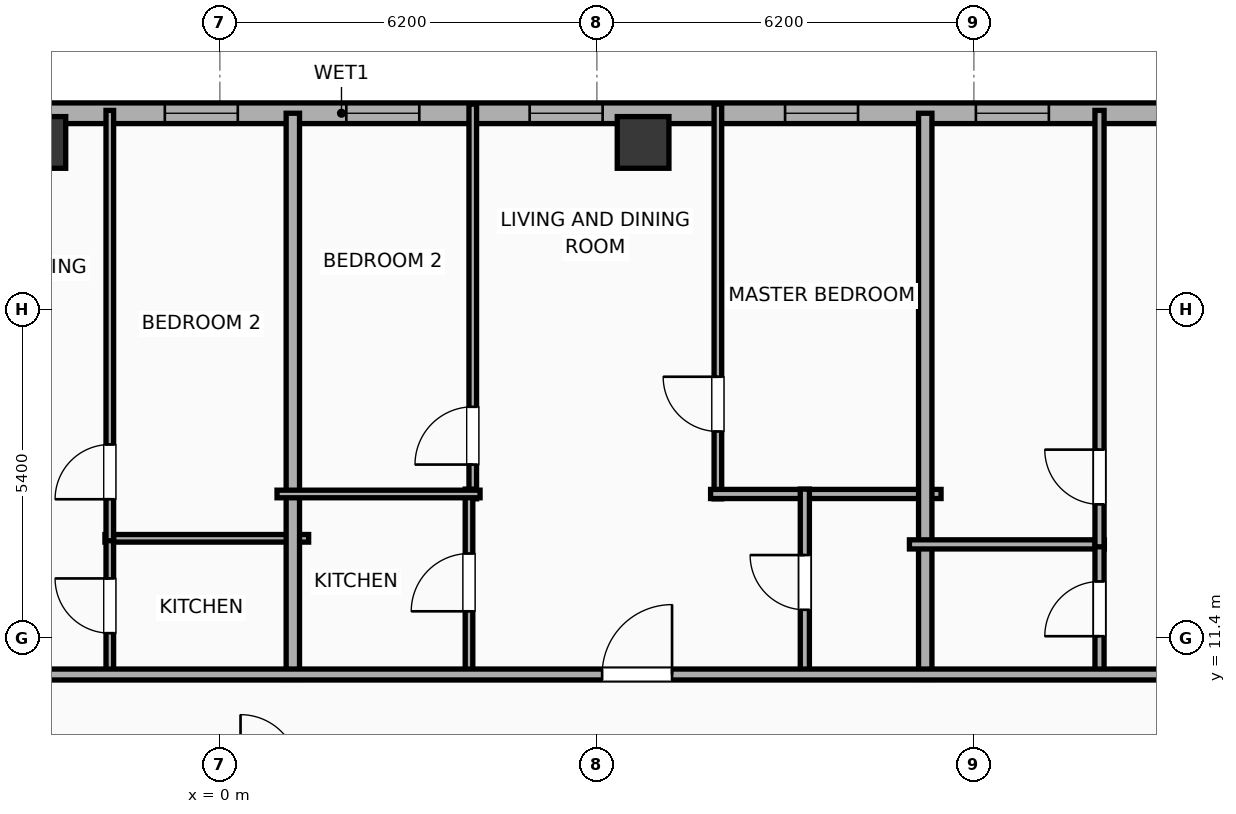
"""IFC4 building model, lengths in metres.
Left out: names, types, materials, properties, quantities, classifications, styles, units other than length and angle.
Written with IfcOpenShell. Run it as: python <this file> out.ifc"""

import sys

from ifc_helpers import new_model, si_unit, direction, frame, frame_2d, origin, origin_2d, place, context, subcontext, project, spatial, rectangle, hollow_rectangle, extrude, element, fill, save


model = new_model("IFC4")
c1 = context("Model", 3, precision=1e-05, world=origin(), true_north=direction((0.0, 1.0)))
c2 = subcontext(c1, "Body", "Model", "MODEL_VIEW")
j1 = project(units=[si_unit("LENGTHUNIT", "METRE"), si_unit("PLANEANGLEUNIT", "RADIAN")], contexts=[c1])
p1 = place(None, origin())
s1 = spatial("IfcSite", under=j1, at=p1, CompositionType="ELEMENT")
p2 = place(p1, origin())
s2 = spatial("IfcBuilding", under=s1, at=p2, CompositionType="ELEMENT")
p3 = place(p2, frame((0.0, 0.0, 215.8)))
s3 = spatial("IfcBuildingStorey", under=s2, at=p3, CompositionType="ELEMENT", Elevation=215.8)
for number, where, z_axis, x_axis in (
    (1, (6.96, 19.55, 0.0), (0.0, 0.0, 1.0), (1.0, 0.0, 0.0)),
    (2, (-2.96, 19.55, 0.0), (0.0, 0.0, 1.0), (1.0, 0.0, 0.0)),
):
    element("IfcColumn", number, at=place(p3, frame(where, z_axis=z_axis, x_axis=x_axis)), inside=s3, PredefinedType="COLUMN", context=c2, shape_type="SweptSolid", body=[
        extrude(hollow_rectangle(XDim=0.85, YDim=0.85, WallThickness=0.028, at=origin_2d()), origin(), (0.0, 0.0, 1.0), 3.9),
    ])
p4 = place(p3, frame((-22.783, 20.03, 0.0), z_axis=(0.0, 0.0, 1.0), x_axis=(1.0, 0.0, 0.0)))
e3 = element("IfcWall", 3, at=p4, inside=s3, PredefinedType="ELEMENTEDWALL", context=c2, shape_type="SweptSolid", body=[
    extrude(rectangle(XDim=49.566, YDim=0.34, at=frame_2d((24.783, 0.0))), origin(), (0.0, 0.0, 1.0), 3.65),
])
p5 = place(p4, frame((40.956, 0.0, 0.75)))
e4 = element("IfcOpeningElement", 4, at=p5, cuts=e3, PredefinedType="OPENING", context=c2, shape_type="SweptSolid", body=[
    extrude(rectangle(XDim=2.4, YDim=2.1, at=frame_2d((1.2, 1.05))), frame((0.0, 0.18, 0.0), z_axis=(0.0, -1.0, 0.0), x_axis=(1.0, 0.0, 0.0)), (0.0, 0.0, 1.0), 0.36),
])
p6 = place(p4, frame((1.437, 0.0, 0.75)))
e5 = element("IfcOpeningElement", 5, at=p6, cuts=e3, PredefinedType="OPENING", context=c2, shape_type="SweptSolid", body=[
    extrude(rectangle(XDim=1.2, YDim=2.05, at=frame_2d((0.6, 1.025))), frame((0.0, 0.18, 0.0), z_axis=(0.0, -1.0, 0.0), x_axis=(1.0, 0.0, 0.0)), (0.0, 0.0, 1.0), 0.36),
])
p7 = place(p4, frame((7.619, 0.0, 0.75)))
e6 = element("IfcOpeningElement", 6, at=p7, cuts=e3, PredefinedType="OPENING", context=c2, shape_type="SweptSolid", body=[
    extrude(rectangle(XDim=1.2, YDim=2.05, at=frame_2d((0.6, 1.025))), frame((0.0, 0.18, 0.0), z_axis=(0.0, -1.0, 0.0), x_axis=(1.0, 0.0, 0.0)), (0.0, 0.0, 1.0), 0.36),
])
p8 = place(p4, frame((4.124, 0.0, 0.75)))
e7 = element("IfcOpeningElement", 7, at=p8, cuts=e3, PredefinedType="OPENING", context=c2, shape_type="SweptSolid", body=[
    extrude(rectangle(XDim=1.2, YDim=2.05, at=frame_2d((0.6, 1.025))), frame((0.0, 0.18, 0.0), z_axis=(0.0, -1.0, 0.0), x_axis=(1.0, 0.0, 0.0)), (0.0, 0.0, 1.0), 0.36),
])
p9 = place(p4, frame((11.278, 0.0, 0.75)))
e8 = element("IfcOpeningElement", 8, at=p9, cuts=e3, PredefinedType="OPENING", context=c2, shape_type="SweptSolid", body=[
    extrude(rectangle(XDim=1.2, YDim=2.05, at=frame_2d((0.6, 1.025))), frame((0.0, 0.18, 0.0), z_axis=(0.0, -1.0, 0.0), x_axis=(1.0, 0.0, 0.0)), (0.0, 0.0, 1.0), 0.36),
])
p10 = place(p4, frame((17.953, 0.0, 0.75)))
e9 = element("IfcOpeningElement", 9, at=p10, cuts=e3, PredefinedType="OPENING", context=c2, shape_type="SweptSolid", body=[
    extrude(rectangle(XDim=1.2, YDim=2.05, at=frame_2d((0.6, 1.025))), frame((0.0, 0.18, 0.0), z_axis=(0.0, -1.0, 0.0), x_axis=(1.0, 0.0, 0.0)), (0.0, 0.0, 1.0), 0.36),
])
p11 = place(p4, frame((14.738, 0.0, 0.75)))
e10 = element("IfcOpeningElement", 10, at=p11, cuts=e3, PredefinedType="OPENING", context=c2, shape_type="SweptSolid", body=[
    extrude(rectangle(XDim=1.2, YDim=2.05, at=frame_2d((0.6, 1.025))), frame((0.0, 0.18, 0.0), z_axis=(0.0, -1.0, 0.0), x_axis=(1.0, 0.0, 0.0)), (0.0, 0.0, 1.0), 0.36),
])
p12 = place(p4, frame((21.878, 0.0, 0.75)))
e11 = element("IfcOpeningElement", 11, at=p12, cuts=e3, PredefinedType="OPENING", context=c2, shape_type="SweptSolid", body=[
    extrude(rectangle(XDim=1.2, YDim=2.05, at=frame_2d((0.6, 1.025))), frame((0.0, 0.18, 0.0), z_axis=(0.0, -1.0, 0.0), x_axis=(1.0, 0.0, 0.0)), (0.0, 0.0, 1.0), 0.36),
])
p13 = place(p4, frame((27.878, 0.0, 0.75)))
e12 = element("IfcOpeningElement", 12, at=p13, cuts=e3, PredefinedType="OPENING", context=c2, shape_type="SweptSolid", body=[
    extrude(rectangle(XDim=1.2, YDim=2.05, at=frame_2d((0.6, 1.025))), frame((0.0, 0.18, 0.0), z_axis=(0.0, -1.0, 0.0), x_axis=(1.0, 0.0, 0.0)), (0.0, 0.0, 1.0), 0.36),
])
p14 = place(p4, frame((24.863, 0.0, 0.75)))
e13 = element("IfcOpeningElement", 13, at=p14, cuts=e3, PredefinedType="OPENING", context=c2, shape_type="SweptSolid", body=[
    extrude(rectangle(XDim=1.2, YDim=2.05, at=frame_2d((0.6, 1.025))), frame((0.0, 0.18, 0.0), z_axis=(0.0, -1.0, 0.0), x_axis=(1.0, 0.0, 0.0)), (0.0, 0.0, 1.0), 0.36),
])
p15 = place(p4, frame((32.078, 0.0, 0.75)))
e14 = element("IfcOpeningElement", 14, at=p15, cuts=e3, PredefinedType="OPENING", context=c2, shape_type="SweptSolid", body=[
    extrude(rectangle(XDim=1.2, YDim=2.05, at=frame_2d((0.6, 1.025))), frame((0.0, 0.18, 0.0), z_axis=(0.0, -1.0, 0.0), x_axis=(1.0, 0.0, 0.0)), (0.0, 0.0, 1.0), 0.36),
])
p16 = place(p4, frame((35.216, 0.0, 0.75)))
e15 = element("IfcOpeningElement", 15, at=p16, cuts=e3, PredefinedType="OPENING", context=c2, shape_type="SweptSolid", body=[
    extrude(rectangle(XDim=1.2, YDim=2.05, at=frame_2d((0.6, 1.025))), frame((0.0, 0.18, 0.0), z_axis=(0.0, -1.0, 0.0), x_axis=(1.0, 0.0, 0.0)), (0.0, 0.0, 1.0), 0.36),
])
p17 = place(p4, frame((45.73, 0.0, 0.75)))
e16 = element("IfcOpeningElement", 16, at=p17, cuts=e3, PredefinedType="OPENING", context=c2, shape_type="SweptSolid", body=[
    extrude(rectangle(XDim=1.2, YDim=2.05, at=frame_2d((0.6, 1.025))), frame((0.0, 0.18, 0.0), z_axis=(0.0, -1.0, 0.0), x_axis=(1.0, 0.0, 0.0)), (0.0, 0.0, 1.0), 0.36),
])
p18 = place(p3, frame((-1.89, 13.04, 0.0), z_axis=(0.0, 0.0, 1.0), x_axis=(1.0, 0.0, 0.0)))
e17 = element("IfcWall", 17, at=p18, inside=s3, PredefinedType="PARTITIONING", context=c2, shape_type="SweptSolid", body=[
    extrude(rectangle(XDim=3.35, YDim=0.125, at=frame_2d((1.675, 0.0))), origin(), (0.0, 0.0, 1.0), 3.65),
])
p19 = place(p3, frame((-1.81, 10.78, 0.0), z_axis=(0.0, 0.0, 1.0), x_axis=(0.0, 1.0, 0.0)))
e18 = element("IfcWall", 18, at=p19, inside=s3, PredefinedType="PARTITIONING", context=c2, shape_type="SweptSolid", body=[
    extrude(rectangle(XDim=2.3, YDim=0.125, at=frame_2d((1.15, 0.0))), origin(), (0.0, 0.0, 1.0), 3.65),
])
p20 = place(p19, frame((0.7, 0.0, 0.0)))
e19 = element("IfcOpeningElement", 19, at=p20, cuts=e18, PredefinedType="OPENING", context=c2, shape_type="SweptSolid", body=[
    extrude(rectangle(XDim=0.9, YDim=2.05, at=frame_2d((0.45, 1.025))), frame((0.0, 0.073, 0.0), z_axis=(0.0, -1.0, 0.0), x_axis=(1.0, 0.0, 0.0)), (0.0, 0.0, 1.0), 0.145),
])
p21 = place(p3, frame((-1.81, 13.0, 0.0), z_axis=(0.0, 0.0, 1.0), x_axis=(0.0, 1.0, 0.0)))
e20 = element("IfcWall", 20, at=p21, inside=s3, PredefinedType="PARTITIONING", context=c2, shape_type="SweptSolid", body=[
    extrude(rectangle(XDim=7.077, YDim=0.125, at=frame_2d((3.539, 0.0))), origin(), (0.0, 0.0, 1.0), 3.65),
])
p22 = place(p21, frame((0.682, 0.0, 0.0)))
e21 = element("IfcOpeningElement", 21, at=p22, cuts=e20, PredefinedType="OPENING", context=c2, shape_type="SweptSolid", body=[
    extrude(rectangle(XDim=0.9, YDim=2.05, at=frame_2d((0.45, 1.025))), frame((0.0, 0.073, 0.0), z_axis=(0.0, -1.0, 0.0), x_axis=(1.0, 0.0, 0.0)), (0.0, 0.0, 1.0), 0.145),
])
p23 = place(p3, frame((1.2, 10.72, 0.0), z_axis=(0.0, 0.0, 1.0), x_axis=(0.0, 1.0, 0.0)))
e22 = element("IfcWall", 22, at=p23, inside=s3, PredefinedType="PARTITIONING", context=c2, shape_type="SweptSolid", body=[
    extrude(rectangle(XDim=9.31, YDim=0.22, at=frame_2d((4.655, 0.0))), origin(), (0.0, 0.0, 1.0), 3.65),
])
p24 = place(p3, frame((4.159, 13.689, 0.0), z_axis=(0.0, 0.0, 1.0), x_axis=(0.0, 1.0, 0.0)))
e23 = element("IfcWall", 23, at=p24, inside=s3, PredefinedType="PARTITIONING", context=c2, shape_type="SweptSolid", body=[
    extrude(rectangle(XDim=6.491, YDim=0.125, at=frame_2d((3.246, 0.0))), origin(), (0.0, 0.0, 1.0), 3.65),
])
p25 = place(p24, frame((0.564, 0.0, 0.0)))
e24 = element("IfcOpeningElement", 24, at=p25, cuts=e23, PredefinedType="OPENING", context=c2, shape_type="SweptSolid", body=[
    extrude(rectangle(XDim=0.95, YDim=2.05, at=frame_2d((0.475, 1.025))), frame((0.0, 0.073, 0.0), z_axis=(0.0, -1.0, 0.0), x_axis=(1.0, 0.0, 0.0)), (0.0, 0.0, 1.0), 0.145),
])
p26 = place(p3, frame((8.19, 13.689, 0.0), z_axis=(0.0, 0.0, 1.0), x_axis=(0.0, 1.0, 0.0)))
e25 = element("IfcWall", 25, at=p26, inside=s3, PredefinedType="PARTITIONING", context=c2, shape_type="SweptSolid", body=[
    extrude(rectangle(XDim=6.491, YDim=0.125, at=frame_2d((3.246, 0.0))), origin(), (0.0, 0.0, 1.0), 3.65),
])
p27 = place(p26, frame((1.108, 0.0, 0.0)))
e26 = element("IfcOpeningElement", 26, at=p27, cuts=e25, PredefinedType="OPENING", context=c2, shape_type="SweptSolid", body=[
    extrude(rectangle(XDim=0.9, YDim=2.05, at=frame_2d((0.45, 1.025))), frame((0.0, 0.073, 0.0), z_axis=(0.0, -1.0, 0.0), x_axis=(1.0, 0.0, 0.0)), (0.0, 0.0, 1.0), 0.145),
])
p28 = place(p3, frame((8.07, 13.769, 0.0), z_axis=(0.0, 0.0, 1.0), x_axis=(1.0, 0.0, 0.0)))
e27 = element("IfcWall", 27, at=p28, inside=s3, PredefinedType="PLUMBINGWALL", context=c2, shape_type="SweptSolid", body=[
    extrude(rectangle(XDim=3.79, YDim=0.15, at=frame_2d((1.895, 0.0))), origin(), (0.0, 0.0, 1.0), 3.65),
])
p29 = place(p3, frame((4.097, 10.78, 0.0), z_axis=(0.0, 0.0, 1.0), x_axis=(0.0, 1.0, 0.0)))
e28 = element("IfcWall", 28, at=p29, inside=s3, PredefinedType="PARTITIONING", context=c2, shape_type="SweptSolid", body=[
    extrude(rectangle(XDim=3.069, YDim=0.125, at=frame_2d((1.535, 0.0))), origin(), (0.0, 0.0, 1.0), 3.65),
])
p30 = place(p29, frame((1.06, 0.0, 0.0)))
e29 = element("IfcOpeningElement", 29, at=p30, cuts=e28, PredefinedType="OPENING", context=c2, shape_type="SweptSolid", body=[
    extrude(rectangle(XDim=0.95, YDim=2.05, at=frame_2d((0.475, 1.025))), frame((0.0, 0.073, 0.0), z_axis=(0.0, -1.0, 0.0), x_axis=(1.0, 0.0, 0.0)), (0.0, 0.0, 1.0), 0.145),
])
p31 = place(p3, frame((0.94, 13.769, 0.0), z_axis=(0.0, 0.0, 1.0), x_axis=(1.0, 0.0, 0.0)))
e30 = element("IfcWall", 30, at=p31, inside=s3, PredefinedType="PARTITIONING", context=c2, shape_type="SweptSolid", body=[
    extrude(rectangle(XDim=3.339, YDim=0.125, at=frame_2d((1.669, 0.0))), origin(), (0.0, 0.0, 1.0), 3.65),
])
p32 = place(p3, frame((9.62, 10.78, 0.0), z_axis=(0.0, 0.0, 1.0), x_axis=(0.0, 1.0, 0.0)))
e31 = element("IfcWall", 31, at=p32, inside=s3, PredefinedType="PLUMBINGWALL", context=c2, shape_type="SweptSolid", body=[
    extrude(rectangle(XDim=3.069, YDim=0.15, at=frame_2d((1.535, 0.0))), origin(), (0.0, 0.0, 1.0), 3.65),
])
p33 = place(p32, frame((1.084, 0.0, 0.0)))
e32 = element("IfcOpeningElement", 32, at=p33, cuts=e31, PredefinedType="OPENING", context=c2, shape_type="SweptSolid", body=[
    extrude(rectangle(XDim=0.9, YDim=2.05, at=frame_2d((0.45, 1.025))), frame((0.0, 0.085, 0.0), z_axis=(0.0, -1.0, 0.0), x_axis=(1.0, 0.0, 0.0)), (0.0, 0.0, 1.0), 0.17),
])
p34 = place(p3, frame((11.6, 10.72, 0.0), z_axis=(0.0, 0.0, 1.0), x_axis=(0.0, 1.0, 0.0)))
e33 = element("IfcWall", 33, at=p34, inside=s3, PredefinedType="PARTITIONING", context=c2, shape_type="SweptSolid", body=[
    extrude(rectangle(XDim=9.31, YDim=0.22, at=frame_2d((4.655, 0.0))), origin(), (0.0, 0.0, 1.0), 3.65),
])
p35 = place(p3, frame((11.34, 12.94, 0.0), z_axis=(0.0, 0.0, 1.0), x_axis=(1.0, 0.0, 0.0)))
e34 = element("IfcWall", 34, at=p35, inside=s3, PredefinedType="PLUMBINGWALL", context=c2, shape_type="SweptSolid", body=[
    extrude(rectangle(XDim=3.206, YDim=0.15, at=frame_2d((1.603, 0.0))), origin(), (0.0, 0.0, 1.0), 3.65),
])
p36 = place(p3, frame((14.466, 10.78, 0.0), z_axis=(0.0, 0.0, 1.0), x_axis=(0.0, 1.0, 0.0)))
e35 = element("IfcWall", 35, at=p36, inside=s3, PredefinedType="PLUMBINGWALL", context=c2, shape_type="SweptSolid", body=[
    extrude(rectangle(XDim=2.2, YDim=0.15, at=frame_2d((1.1, 0.0))), origin(), (0.0, 0.0, 1.0), 3.65),
])
p37 = place(p36, frame((0.65, 0.0, 0.0)))
e36 = element("IfcOpeningElement", 36, at=p37, cuts=e35, PredefinedType="OPENING", context=c2, shape_type="SweptSolid", body=[
    extrude(rectangle(XDim=0.9, YDim=2.05, at=frame_2d((0.45, 1.025))), frame((0.0, 0.085, 0.0), z_axis=(0.0, -1.0, 0.0), x_axis=(1.0, 0.0, 0.0)), (0.0, 0.0, 1.0), 0.17),
])
p38 = place(p3, frame((14.466, 12.9, 0.0), z_axis=(0.0, 0.0, 1.0), x_axis=(0.0, 1.0, 0.0)))
e37 = element("IfcWall", 37, at=p38, inside=s3, PredefinedType="PLUMBINGWALL", context=c2, shape_type="SweptSolid", body=[
    extrude(rectangle(XDim=7.177, YDim=0.15, at=frame_2d((3.588, 0.0))), origin(), (0.0, 0.0, 1.0), 3.65),
])
p39 = place(p38, frame((0.698, 0.0, 0.0)))
e38 = element("IfcOpeningElement", 38, at=p39, cuts=e37, PredefinedType="OPENING", context=c2, shape_type="SweptSolid", body=[
    extrude(rectangle(XDim=0.9, YDim=2.05, at=frame_2d((0.45, 1.025))), frame((0.0, 0.085, 0.0), z_axis=(0.0, -1.0, 0.0), x_axis=(1.0, 0.0, 0.0)), (0.0, 0.0, 1.0), 0.17),
])
p40 = place(p3, frame((-26.23, 10.8, 0.0), z_axis=(0.0, 0.0, 1.0), x_axis=(1.0, 0.0, 0.0)))
e39 = element("IfcWall", 39, at=p40, inside=s3, PredefinedType="PARTITIONING", context=c2, shape_type="SweptSolid", body=[
    extrude(rectangle(XDim=56.46, YDim=0.18, at=frame_2d((28.23, 0.0))), origin(), (0.0, 0.0, 1.0), 3.65),
])
p41 = place(p40, frame((2.994, 0.0, 0.0)))
e40 = element("IfcOpeningElement", 40, at=p41, cuts=e39, PredefinedType="OPENING", context=c2, shape_type="SweptSolid", body=[
    extrude(rectangle(XDim=0.9, YDim=2.05, at=frame_2d((0.45, 1.025))), frame((0.0, 0.1, 0.0), z_axis=(0.0, -1.0, 0.0), x_axis=(1.0, 0.0, 0.0)), (0.0, 0.0, 1.0), 0.2),
])
p42 = place(p40, frame((11.745, 0.0, 0.0)))
e41 = element("IfcOpeningElement", 41, at=p42, cuts=e39, PredefinedType="OPENING", context=c2, shape_type="SweptSolid", body=[
    extrude(rectangle(XDim=1.15, YDim=2.05, at=frame_2d((0.575, 1.025))), frame((0.0, 0.1, 0.0), z_axis=(0.0, -1.0, 0.0), x_axis=(1.0, 0.0, 0.0)), (0.0, 0.0, 1.0), 0.2),
])
p43 = place(p40, frame((21.907, 0.0, 0.0)))
e42 = element("IfcOpeningElement", 42, at=p43, cuts=e39, PredefinedType="OPENING", context=c2, shape_type="SweptSolid", body=[
    extrude(rectangle(XDim=1.15, YDim=2.05, at=frame_2d((0.575, 1.025))), frame((0.0, 0.1, 0.0), z_axis=(0.0, -1.0, 0.0), x_axis=(1.0, 0.0, 0.0)), (0.0, 0.0, 1.0), 0.2),
])
p44 = place(p40, frame((32.516, 0.0, 0.0)))
e43 = element("IfcOpeningElement", 43, at=p44, cuts=e39, PredefinedType="OPENING", context=c2, shape_type="SweptSolid", body=[
    extrude(rectangle(XDim=1.15, YDim=2.05, at=frame_2d((0.575, 1.025))), frame((0.0, 0.1, 0.0), z_axis=(0.0, -1.0, 0.0), x_axis=(1.0, 0.0, 0.0)), (0.0, 0.0, 1.0), 0.2),
])
p45 = place(p40, frame((41.956, 0.0, 0.0)))
e44 = element("IfcOpeningElement", 44, at=p45, cuts=e39, PredefinedType="OPENING", context=c2, shape_type="SweptSolid", body=[
    extrude(rectangle(XDim=1.15, YDim=2.05, at=frame_2d((0.575, 1.025))), frame((0.0, 0.1, 0.0), z_axis=(0.0, -1.0, 0.0), x_axis=(1.0, 0.0, 0.0)), (0.0, 0.0, 1.0), 0.2),
])
p46 = place(p40, frame((51.656, 0.0, 0.0)))
e45 = element("IfcOpeningElement", 45, at=p46, cuts=e39, PredefinedType="OPENING", context=c2, shape_type="SweptSolid", body=[
    extrude(rectangle(XDim=1.15, YDim=2.05, at=frame_2d((0.575, 1.025))), frame((0.0, 0.1, 0.0), z_axis=(0.0, -1.0, 0.0), x_axis=(1.0, 0.0, 0.0)), (0.0, 0.0, 1.0), 0.2),
])
p47 = place(p12, origin())
e46 = element("IfcWindow", 46, at=p47, inside=s3, PartitioningType="SINGLE_PANEL", PredefinedType="WINDOW", context=c2, shape_type="SweptSolid", body=[
    extrude(rectangle(XDim=1.2, YDim=2.05, at=frame_2d((0.6, 1.025))), frame((0.0, 0.03, 0.0), z_axis=(0.0, -1.0, 0.0), x_axis=(1.0, 0.0, 0.0)), (0.0, 0.0, 1.0), 0.06),
])
fill(e11, e46)
p48 = place(p13, origin())
e47 = element("IfcWindow", 47, at=p48, inside=s3, PartitioningType="SINGLE_PANEL", PredefinedType="WINDOW", context=c2, shape_type="SweptSolid", body=[
    extrude(rectangle(XDim=1.2, YDim=2.05, at=frame_2d((0.6, 1.025))), frame((0.0, 0.03, 0.0), z_axis=(0.0, -1.0, 0.0), x_axis=(1.0, 0.0, 0.0)), (0.0, 0.0, 1.0), 0.06),
])
fill(e12, e47)
p49 = place(p14, origin())
e48 = element("IfcWindow", 48, at=p49, inside=s3, PartitioningType="SINGLE_PANEL", PredefinedType="WINDOW", context=c2, shape_type="SweptSolid", body=[
    extrude(rectangle(XDim=1.2, YDim=2.05, at=frame_2d((0.6, 1.025))), frame((0.0, 0.03, 0.0), z_axis=(0.0, -1.0, 0.0), x_axis=(1.0, 0.0, 0.0)), (0.0, 0.0, 1.0), 0.06),
])
fill(e13, e48)
p50 = place(p15, origin())
e49 = element("IfcWindow", 49, at=p50, inside=s3, PartitioningType="SINGLE_PANEL", PredefinedType="WINDOW", context=c2, shape_type="SweptSolid", body=[
    extrude(rectangle(XDim=1.2, YDim=2.05, at=frame_2d((0.6, 1.025))), frame((0.0, 0.03, 0.0), z_axis=(0.0, -1.0, 0.0), x_axis=(1.0, 0.0, 0.0)), (0.0, 0.0, 1.0), 0.06),
])
fill(e14, e49)
p51 = place(p16, origin())
e50 = element("IfcWindow", 50, at=p51, inside=s3, PartitioningType="SINGLE_PANEL", PredefinedType="WINDOW", context=c2, shape_type="SweptSolid", body=[
    extrude(rectangle(XDim=1.2, YDim=2.05, at=frame_2d((0.6, 1.025))), frame((0.0, 0.03, 0.0), z_axis=(0.0, -1.0, 0.0), x_axis=(1.0, 0.0, 0.0)), (0.0, 0.0, 1.0), 0.06),
])
fill(e15, e50)
p52 = place(p20, origin())
e51 = element("IfcDoor", 51, at=p52, inside=s3, OperationType="SINGLE_SWING_RIGHT", PredefinedType="DOOR", context=c2, shape_type="SweptSolid", body=[
    extrude(rectangle(XDim=0.9, YDim=2.05, at=frame_2d((0.45, 1.025))), frame((0.0, 0.025, 0.0), z_axis=(0.0, -1.0, 0.0), x_axis=(1.0, 0.0, 0.0)), (0.0, 0.0, 1.0), 0.05),
])
fill(e19, e51)
p53 = place(p22, origin())
e52 = element("IfcDoor", 52, at=p53, inside=s3, OperationType="SINGLE_SWING_LEFT", PredefinedType="DOOR", context=c2, shape_type="SweptSolid", body=[
    extrude(rectangle(XDim=0.9, YDim=2.05, at=frame_2d((0.45, 1.025))), frame((0.0, 0.025, 0.0), z_axis=(0.0, -1.0, 0.0), x_axis=(1.0, 0.0, 0.0)), (0.0, 0.0, 1.0), 0.05),
])
fill(e21, e52)
p54 = place(p25, origin())
e53 = element("IfcDoor", 53, at=p54, inside=s3, OperationType="SINGLE_SWING_LEFT", PredefinedType="DOOR", context=c2, shape_type="SweptSolid", body=[
    extrude(rectangle(XDim=0.95, YDim=2.05, at=frame_2d((0.475, 1.025))), frame((0.0, 0.025, 0.0), z_axis=(0.0, -1.0, 0.0), x_axis=(1.0, 0.0, 0.0)), (0.0, 0.0, 1.0), 0.05),
])
fill(e24, e53)
p55 = place(p27, origin())
e54 = element("IfcDoor", 54, at=p55, inside=s3, OperationType="SINGLE_SWING_RIGHT", PredefinedType="DOOR", context=c2, shape_type="SweptSolid", body=[
    extrude(rectangle(XDim=0.9, YDim=2.05, at=frame_2d((0.45, 1.025))), frame((0.0, 0.025, 0.0), z_axis=(0.0, -1.0, 0.0), x_axis=(1.0, 0.0, 0.0)), (0.0, 0.0, 1.0), 0.05),
])
fill(e26, e54)
p56 = place(p30, origin())
e55 = element("IfcDoor", 55, at=p56, inside=s3, OperationType="SINGLE_SWING_LEFT", PredefinedType="DOOR", context=c2, shape_type="SweptSolid", body=[
    extrude(rectangle(XDim=0.95, YDim=2.05, at=frame_2d((0.475, 1.025))), frame((0.0, 0.025, 0.0), z_axis=(0.0, -1.0, 0.0), x_axis=(1.0, 0.0, 0.0)), (0.0, 0.0, 1.0), 0.05),
])
fill(e29, e55)
p57 = place(p33, origin())
e56 = element("IfcDoor", 56, at=p57, inside=s3, OperationType="SINGLE_SWING_RIGHT", PredefinedType="DOOR", context=c2, shape_type="SweptSolid", body=[
    extrude(rectangle(XDim=0.9, YDim=2.05, at=frame_2d((0.45, 1.025))), frame((0.0, 0.025, 0.0), z_axis=(0.0, -1.0, 0.0), x_axis=(1.0, 0.0, 0.0)), (0.0, 0.0, 1.0), 0.05),
])
fill(e32, e56)
p58 = place(p37, origin())
e57 = element("IfcDoor", 57, at=p58, inside=s3, OperationType="SINGLE_SWING_LEFT", PredefinedType="DOOR", context=c2, shape_type="SweptSolid", body=[
    extrude(rectangle(XDim=0.9, YDim=2.05, at=frame_2d((0.45, 1.025))), frame((0.0, 0.025, 0.0), z_axis=(0.0, -1.0, 0.0), x_axis=(1.0, 0.0, 0.0)), (0.0, 0.0, 1.0), 0.05),
])
fill(e36, e57)
p59 = place(p39, origin())
e58 = element("IfcDoor", 58, at=p59, inside=s3, OperationType="SINGLE_SWING_RIGHT", PredefinedType="DOOR", context=c2, shape_type="SweptSolid", body=[
    extrude(rectangle(XDim=0.9, YDim=2.05, at=frame_2d((0.45, 1.025))), frame((0.0, 0.025, 0.0), z_axis=(0.0, -1.0, 0.0), x_axis=(1.0, 0.0, 0.0)), (0.0, 0.0, 1.0), 0.05),
])
fill(e38, e58)
p60 = place(p44, origin())
e59 = element("IfcDoor", 59, at=p60, inside=s3, OperationType="SINGLE_SWING_RIGHT", PredefinedType="DOOR", context=c2, shape_type="SweptSolid", body=[
    extrude(rectangle(XDim=1.15, YDim=2.05, at=frame_2d((0.575, 1.025))), frame((0.0, 0.025, 0.0), z_axis=(0.0, -1.0, 0.0), x_axis=(1.0, 0.0, 0.0)), (0.0, 0.0, 1.0), 0.05),
])
fill(e43, e59)
save(model, sys.argv[1])
